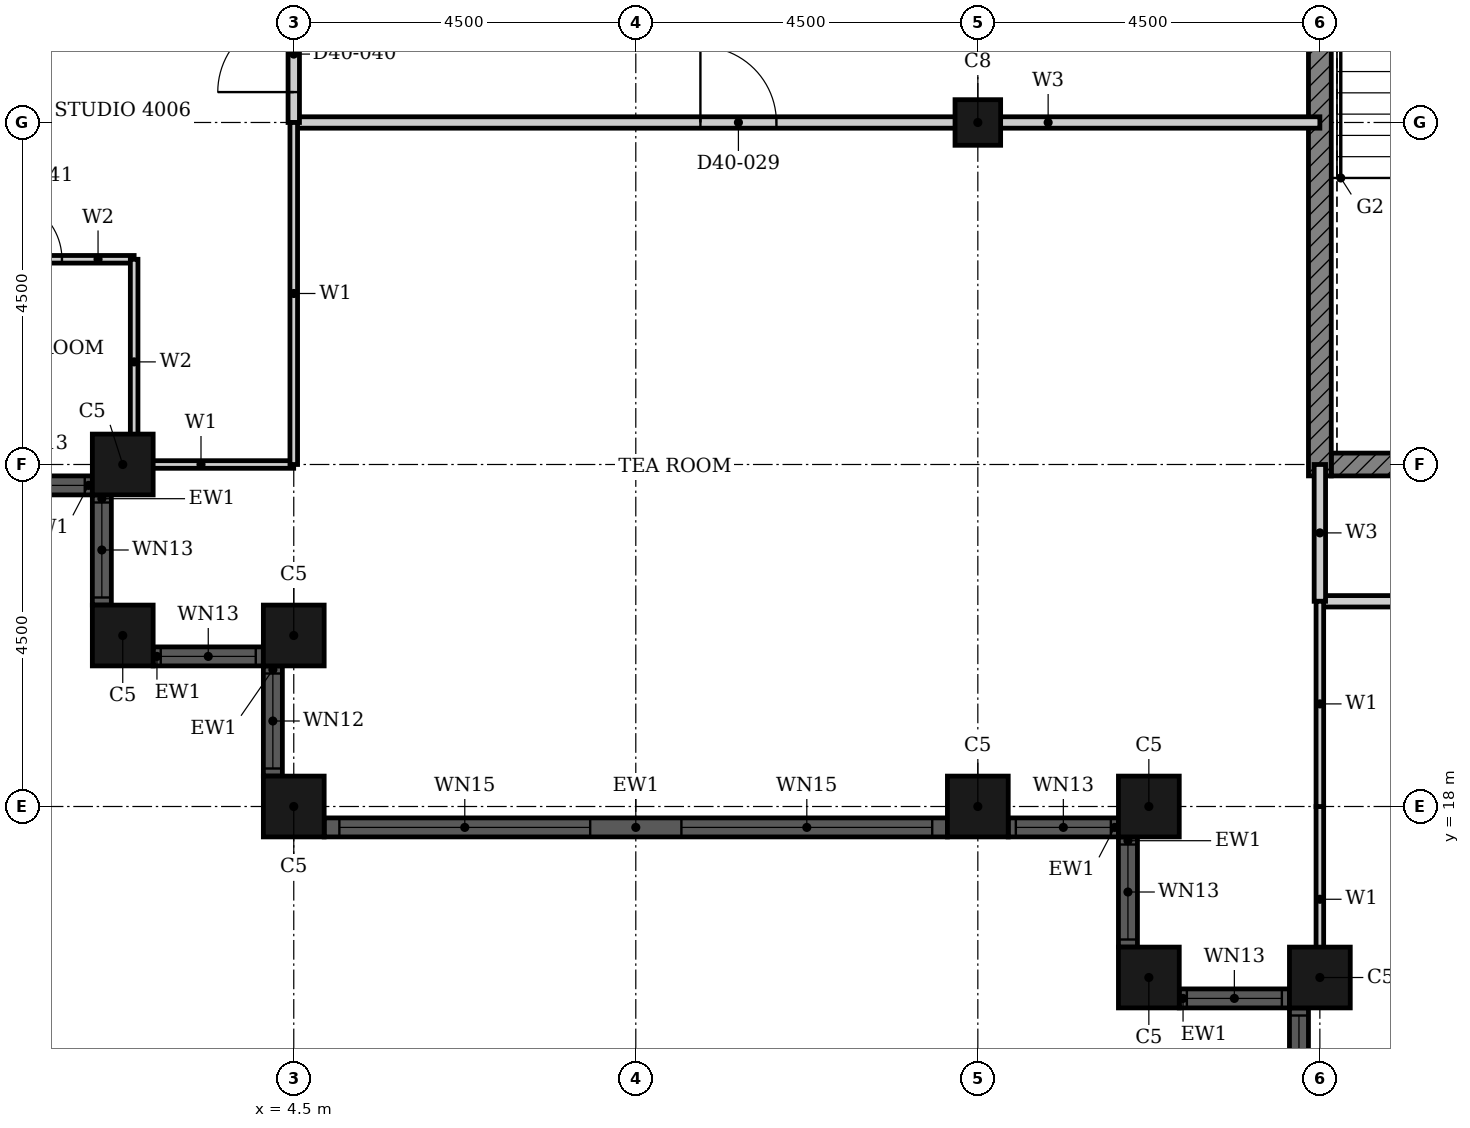
"""IFC4 building model, lengths in metres.
Left out: names, types, materials, properties, quantities, classifications, styles, units other than length and angle.
Written with IfcOpenShell. Run it as: python <this file> out.ifc"""

import sys

from ifc_helpers import new_model, si_unit, direction, frame, frame_2d, origin, origin_2d, place, context, subcontext, project, spatial, rectangle, hollow_rectangle, extrude, element, fill, save


model = new_model("IFC4")
c1 = context("Model", 3, precision=1e-05, world=origin(), true_north=direction((0.0, 1.0)))
c2 = subcontext(c1, "Body", "Model", "MODEL_VIEW")
j1 = project(units=[si_unit("LENGTHUNIT", "METRE"), si_unit("PLANEANGLEUNIT", "RADIAN")], contexts=[c1])
p1 = place(None, origin())
s1 = spatial("IfcSite", under=j1, at=p1, CompositionType="ELEMENT")
p2 = place(p1, origin())
s2 = spatial("IfcBuilding", under=s1, at=p2, CompositionType="ELEMENT")
p3 = place(p2, frame((0.0, 0.0, 161.7)))
s3 = spatial("IfcBuildingStorey", under=s2, at=p3, CompositionType="ELEMENT", Elevation=161.7)
for number, where, z_axis, x_axis in (
    (1, (2.25, 22.5, 0.0), (0.0, 0.0, 1.0), (1.0, 0.0, 0.0)),
    (2, (2.25, 20.25, 0.0), (0.0, 0.0, 1.0), (1.0, 0.0, 0.0)),
    (3, (4.5, 20.25, 0.0), (0.0, 0.0, 1.0), (1.0, 0.0, 0.0)),
    (4, (4.5, 18.0, 0.0), (0.0, 0.0, 1.0), (1.0, 0.0, 0.0)),
    (5, (13.5, 18.0, 0.0), (0.0, 0.0, 1.0), (1.0, 0.0, 0.0)),
    (6, (15.75, 18.0, 0.0), (0.0, 0.0, 1.0), (1.0, 0.0, 0.0)),
    (7, (15.75, 15.75, 0.0), (0.0, 0.0, 1.0), (1.0, 0.0, 0.0)),
    (8, (18.0, 15.75, 0.0), (0.0, 0.0, 1.0), (1.0, 0.0, 0.0)),
):
    element("IfcColumn", number, at=place(p3, frame(where, z_axis=z_axis, x_axis=x_axis)), inside=s3, PredefinedType="COLUMN", context=c2, shape_type="SweptSolid", body=[
        extrude(hollow_rectangle(XDim=0.8, YDim=0.8, WallThickness=0.025, at=origin_2d()), origin(), (0.0, 0.0, 1.0), 3.7),
    ])
p4 = place(p3, frame((13.5, 27.0, 0.0), z_axis=(0.0, 0.0, 1.0), x_axis=(1.0, 0.0, 0.0)))
e9 = element("IfcColumn", 9, at=p4, inside=s3, PredefinedType="COLUMN", context=c2, shape_type="SweptSolid", body=[
    extrude(hollow_rectangle(XDim=0.6, YDim=0.6, WallThickness=0.02, at=origin_2d()), origin(), (0.0, 0.0, 1.0), 3.7),
])
p5 = place(p3, frame((0.4, 22.225, 0.0), z_axis=(0.0, 0.0, 1.0), x_axis=(1.0, 0.0, 0.0)))
e10 = element("IfcWall", 10, at=p5, inside=s3, PredefinedType="SOLIDWALL", context=c2, shape_type="SweptSolid", body=[
    extrude(rectangle(XDim=1.45, YDim=0.25, at=frame_2d((0.725, 0.0))), origin(), (0.0, 0.0, 1.0), 3.7),
])
p6 = place(p5, frame((0.1, 0.0, 0.9)))
e11 = element("IfcOpeningElement", 11, at=p6, cuts=e10, PredefinedType="OPENING", context=c2, shape_type="SweptSolid", body=[
    extrude(rectangle(XDim=1.25, YDim=1.85, at=frame_2d((0.625, 0.925))), frame((0.0, 0.135, 0.0), z_axis=(0.0, -1.0, 0.0), x_axis=(1.0, 0.0, 0.0)), (0.0, 0.0, 1.0), 0.27),
])
p7 = place(p3, frame((1.975, 22.1, 0.0), z_axis=(0.0, 0.0, 1.0), x_axis=(0.0, -1.0, 0.0)))
e12 = element("IfcWall", 12, at=p7, inside=s3, PredefinedType="SOLIDWALL", context=c2, shape_type="SweptSolid", body=[
    extrude(rectangle(XDim=1.45, YDim=0.25, at=frame_2d((0.725, 0.0))), origin(), (0.0, 0.0, 1.0), 3.7),
])
p8 = place(p7, frame((0.1, 0.0, 0.9)))
e13 = element("IfcOpeningElement", 13, at=p8, cuts=e12, PredefinedType="OPENING", context=c2, shape_type="SweptSolid", body=[
    extrude(rectangle(XDim=1.25, YDim=1.85, at=frame_2d((0.625, 0.925))), frame((0.0, 0.135, 0.0), z_axis=(0.0, -1.0, 0.0), x_axis=(1.0, 0.0, 0.0)), (0.0, 0.0, 1.0), 0.27),
])
p9 = place(p3, frame((2.65, 19.975, 0.0), z_axis=(0.0, 0.0, 1.0), x_axis=(1.0, 0.0, 0.0)))
e14 = element("IfcWall", 14, at=p9, inside=s3, PredefinedType="SOLIDWALL", context=c2, shape_type="SweptSolid", body=[
    extrude(rectangle(XDim=1.45, YDim=0.25, at=frame_2d((0.725, 0.0))), origin(), (0.0, 0.0, 1.0), 3.7),
])
p10 = place(p9, frame((0.1, 0.0, 0.9)))
e15 = element("IfcOpeningElement", 15, at=p10, cuts=e14, PredefinedType="OPENING", context=c2, shape_type="SweptSolid", body=[
    extrude(rectangle(XDim=1.25, YDim=1.85, at=frame_2d((0.625, 0.925))), frame((0.0, 0.135, 0.0), z_axis=(0.0, -1.0, 0.0), x_axis=(1.0, 0.0, 0.0)), (0.0, 0.0, 1.0), 0.27),
])
p11 = place(p3, frame((4.225, 19.85, 0.0), z_axis=(0.0, 0.0, 1.0), x_axis=(0.0, -1.0, 0.0)))
e16 = element("IfcWall", 16, at=p11, inside=s3, PredefinedType="SOLIDWALL", context=c2, shape_type="SweptSolid", body=[
    extrude(rectangle(XDim=1.45, YDim=0.25, at=frame_2d((0.725, 0.0))), origin(), (0.0, 0.0, 1.0), 3.7),
])
p12 = place(p11, frame((0.1, 0.0, 0.9)))
e17 = element("IfcOpeningElement", 17, at=p12, cuts=e16, PredefinedType="OPENING", context=c2, shape_type="SweptSolid", body=[
    extrude(rectangle(XDim=1.25, YDim=2.08, at=frame_2d((0.625, 1.04))), frame((0.0, 0.135, 0.0), z_axis=(0.0, -1.0, 0.0), x_axis=(1.0, 0.0, 0.0)), (0.0, 0.0, 1.0), 0.27),
])
p13 = place(p3, frame((4.9, 17.725, 0.0), z_axis=(0.0, 0.0, 1.0), x_axis=(1.0, 0.0, 0.0)))
e18 = element("IfcWall", 18, at=p13, inside=s3, PredefinedType="SOLIDWALL", context=c2, shape_type="SweptSolid", body=[
    extrude(rectangle(XDim=8.2, YDim=0.25, at=frame_2d((4.1, 0.0))), origin(), (0.0, 0.0, 1.0), 3.7),
])
p14 = place(p13, frame((0.2, 0.0, 0.45)))
e19 = element("IfcOpeningElement", 19, at=p14, cuts=e18, PredefinedType="OPENING", context=c2, shape_type="SweptSolid", body=[
    extrude(rectangle(XDim=3.3, YDim=2.3, at=frame_2d((1.65, 1.15))), frame((0.0, 0.135, 0.0), z_axis=(0.0, -1.0, 0.0), x_axis=(1.0, 0.0, 0.0)), (0.0, 0.0, 1.0), 0.27),
])
p15 = place(p13, frame((4.7, 0.0, 0.45)))
e20 = element("IfcOpeningElement", 20, at=p15, cuts=e18, PredefinedType="OPENING", context=c2, shape_type="SweptSolid", body=[
    extrude(rectangle(XDim=3.3, YDim=2.3, at=frame_2d((1.65, 1.15))), frame((0.0, 0.135, 0.0), z_axis=(0.0, -1.0, 0.0), x_axis=(1.0, 0.0, 0.0)), (0.0, 0.0, 1.0), 0.27),
])
p16 = place(p3, frame((13.9, 17.725, 0.0), z_axis=(0.0, 0.0, 1.0), x_axis=(1.0, 0.0, 0.0)))
e21 = element("IfcWall", 21, at=p16, inside=s3, PredefinedType="SOLIDWALL", context=c2, shape_type="SweptSolid", body=[
    extrude(rectangle(XDim=1.45, YDim=0.25, at=frame_2d((0.725, 0.0))), origin(), (0.0, 0.0, 1.0), 3.7),
])
p17 = place(p16, frame((0.1, 0.0, 0.9)))
e22 = element("IfcOpeningElement", 22, at=p17, cuts=e21, PredefinedType="OPENING", context=c2, shape_type="SweptSolid", body=[
    extrude(rectangle(XDim=1.25, YDim=1.85, at=frame_2d((0.625, 0.925))), frame((0.0, 0.135, 0.0), z_axis=(0.0, -1.0, 0.0), x_axis=(1.0, 0.0, 0.0)), (0.0, 0.0, 1.0), 0.27),
])
p18 = place(p3, frame((15.475, 17.6, 0.0), z_axis=(0.0, 0.0, 1.0), x_axis=(0.0, -1.0, 0.0)))
e23 = element("IfcWall", 23, at=p18, inside=s3, PredefinedType="SOLIDWALL", context=c2, shape_type="SweptSolid", body=[
    extrude(rectangle(XDim=1.45, YDim=0.25, at=frame_2d((0.725, 0.0))), origin(), (0.0, 0.0, 1.0), 3.7),
])
p19 = place(p18, frame((0.1, 0.0, 0.9)))
e24 = element("IfcOpeningElement", 24, at=p19, cuts=e23, PredefinedType="OPENING", context=c2, shape_type="SweptSolid", body=[
    extrude(rectangle(XDim=1.25, YDim=1.85, at=frame_2d((0.625, 0.925))), frame((0.0, 0.135, 0.0), z_axis=(0.0, -1.0, 0.0), x_axis=(1.0, 0.0, 0.0)), (0.0, 0.0, 1.0), 0.27),
])
p20 = place(p3, frame((16.15, 15.475, 0.0), z_axis=(0.0, 0.0, 1.0), x_axis=(1.0, 0.0, 0.0)))
e25 = element("IfcWall", 25, at=p20, inside=s3, PredefinedType="SOLIDWALL", context=c2, shape_type="SweptSolid", body=[
    extrude(rectangle(XDim=1.45, YDim=0.25, at=frame_2d((0.725, 0.0))), origin(), (0.0, 0.0, 1.0), 3.7),
])
p21 = place(p20, frame((0.1, 0.0, 0.9)))
e26 = element("IfcOpeningElement", 26, at=p21, cuts=e25, PredefinedType="OPENING", context=c2, shape_type="SweptSolid", body=[
    extrude(rectangle(XDim=1.25, YDim=1.85, at=frame_2d((0.625, 0.925))), frame((0.0, 0.135, 0.0), z_axis=(0.0, -1.0, 0.0), x_axis=(1.0, 0.0, 0.0)), (0.0, 0.0, 1.0), 0.27),
])
p22 = place(p3, frame((17.725, 15.35, 0.0), z_axis=(0.0, 0.0, 1.0), x_axis=(0.0, -1.0, 0.0)))
e27 = element("IfcWall", 27, at=p22, inside=s3, PredefinedType="SOLIDWALL", context=c2, shape_type="SweptSolid", body=[
    extrude(rectangle(XDim=1.45, YDim=0.25, at=frame_2d((0.725, 0.0))), origin(), (0.0, 0.0, 1.0), 3.7),
])
p23 = place(p22, frame((0.1, 0.0, 0.9)))
e28 = element("IfcOpeningElement", 28, at=p23, cuts=e27, PredefinedType="OPENING", context=c2, shape_type="SweptSolid", body=[
    extrude(rectangle(XDim=1.25, YDim=1.85, at=frame_2d((0.625, 0.925))), frame((0.0, 0.135, 0.0), z_axis=(0.0, -1.0, 0.0), x_axis=(1.0, 0.0, 0.0)), (0.0, 0.0, 1.0), 0.27),
])
p24 = place(p3, frame((18.15, 22.5, 0.0), z_axis=(0.0, 0.0, 1.0), x_axis=(1.0, 0.0, 0.0)))
e29 = element("IfcWall", 29, at=p24, inside=s3, PredefinedType="SHEAR", context=c2, shape_type="SweptSolid", body=[
    extrude(rectangle(XDim=4.225, YDim=0.3, at=frame_2d((2.113, 0.0))), origin(), (0.0, 0.0, 1.0), 3.4),
])
p25 = place(p3, frame((18.0, 22.35, 0.0), z_axis=(0.0, 0.0, 1.0), x_axis=(0.0, 1.0, 0.0)))
e30 = element("IfcWall", 30, at=p25, inside=s3, PredefinedType="SHEAR", context=c2, shape_type="SweptSolid", body=[
    extrude(rectangle(XDim=9.3, YDim=0.3, at=frame_2d((4.65, 0.0))), origin(), (0.0, 0.0, 1.0), 3.4),
])
p26 = place(p3, frame((18.0, 20.7, 0.0), z_axis=(0.0, 0.0, 1.0), x_axis=(1.0, 0.0, 0.0)))
e31 = element("IfcWall", 31, at=p26, inside=s3, PredefinedType="PARTITIONING", context=c2, shape_type="SweptSolid", body=[
    extrude(rectangle(XDim=13.5, YDim=0.15, at=frame_2d((6.75, 0.0))), origin(), (0.0, 0.0, 1.0), 3.4),
])
p27 = place(p26, frame((6.25, 0.0, 0.0)))
e32 = element("IfcOpeningElement", 32, at=p27, cuts=e31, PredefinedType="OPENING", context=c2, shape_type="SweptSolid", body=[
    extrude(rectangle(XDim=1.0, YDim=2.1, at=frame_2d((0.5, 1.05))), frame((0.0, 0.085, 0.0), z_axis=(0.0, -1.0, 0.0), x_axis=(1.0, 0.0, 0.0)), (0.0, 0.0, 1.0), 0.17),
])
p28 = place(p3, frame((4.5, 27.0, 0.0), z_axis=(0.0, 0.0, 1.0), x_axis=(1.0, 0.0, 0.0)))
e33 = element("IfcWall", 33, at=p28, inside=s3, PredefinedType="PARTITIONING", context=c2, shape_type="SweptSolid", body=[
    extrude(rectangle(XDim=13.5, YDim=0.15, at=frame_2d((6.75, 0.0))), origin(), (0.0, 0.0, 1.0), 2.68),
])
p29 = place(p28, frame((5.35, 0.0, 0.0)))
e34 = element("IfcOpeningElement", 34, at=p29, cuts=e33, PredefinedType="OPENING", context=c2, shape_type="SweptSolid", body=[
    extrude(rectangle(XDim=1.0, YDim=2.1, at=frame_2d((0.5, 1.05))), frame((0.0, 0.085, 0.0), z_axis=(0.0, -1.0, 0.0), x_axis=(1.0, 0.0, 0.0)), (0.0, 0.0, 1.0), 0.17),
])
p30 = place(p3, frame((18.0, 20.7, 0.0), z_axis=(0.0, 0.0, 1.0), x_axis=(0.0, 1.0, 0.0)))
e35 = element("IfcWall", 35, at=p30, inside=s3, PredefinedType="PARTITIONING", context=c2, shape_type="SweptSolid", body=[
    extrude(rectangle(XDim=1.8, YDim=0.15, at=frame_2d((0.9, 0.0))), origin(), (0.0, 0.0, 1.0), 3.4),
])
p31 = place(p3, frame((4.5, 27.0, 0.0), z_axis=(0.0, 0.0, 1.0), x_axis=(0.0, 1.0, 0.0)))
e36 = element("IfcWall", 36, at=p31, inside=s3, PredefinedType="PARTITIONING", context=c2, shape_type="SweptSolid", body=[
    extrude(rectangle(XDim=1.8, YDim=0.15, at=frame_2d((0.9, 0.0))), origin(), (0.0, 0.0, 1.0), 3.4),
])
p32 = place(p31, frame((0.4, 0.0, 0.0)))
e37 = element("IfcOpeningElement", 37, at=p32, cuts=e36, PredefinedType="OPENING", context=c2, shape_type="SweptSolid", body=[
    extrude(rectangle(XDim=1.0, YDim=2.2, at=frame_2d((0.5, 1.1))), frame((0.0, 0.085, 0.0), z_axis=(0.0, -1.0, 0.0), x_axis=(1.0, 0.0, 0.0)), (0.0, 0.0, 1.0), 0.17),
])
p33 = place(p3, frame((2.06, 22.5, 0.0), z_axis=(0.0, 0.0, 1.0), x_axis=(1.0, 0.0, 0.0)))
e38 = element("IfcWall", 38, at=p33, inside=s3, PredefinedType="PARTITIONING", context=c2, shape_type="SweptSolid", body=[
    extrude(rectangle(XDim=2.439, YDim=0.1, at=frame_2d((1.219, 0.0))), origin(), (0.0, 0.0, 1.0), 2.68),
])
p34 = place(p3, frame((18.0, 15.56, 0.0), z_axis=(0.0, 0.0, 1.0), x_axis=(0.0, 1.0, 0.0)))
e39 = element("IfcWall", 39, at=p34, inside=s3, PredefinedType="PARTITIONING", context=c2, shape_type="SweptSolid", body=[
    extrude(rectangle(XDim=2.439, YDim=0.1, at=frame_2d((1.219, 0.0))), origin(), (0.0, 0.0, 1.0), 3.4),
])
p35 = place(p3, frame((18.0, 18.0, 0.0), z_axis=(0.0, 0.0, 1.0), x_axis=(0.0, 1.0, 0.0)))
e40 = element("IfcWall", 40, at=p35, inside=s3, PredefinedType="PARTITIONING", context=c2, shape_type="SweptSolid", body=[
    extrude(rectangle(XDim=2.7, YDim=0.1, at=frame_2d((1.35, 0.0))), origin(), (0.0, 0.0, 1.0), 3.4),
])
p36 = place(p3, frame((4.5, 22.5, 0.0), z_axis=(0.0, 0.0, 1.0), x_axis=(0.0, 1.0, 0.0)))
e41 = element("IfcWall", 41, at=p36, inside=s3, PredefinedType="PARTITIONING", context=c2, shape_type="SweptSolid", body=[
    extrude(rectangle(XDim=4.5, YDim=0.1, at=frame_2d((2.25, 0.0))), origin(), (0.0, 0.0, 1.0), 3.4),
])
p37 = place(p3, frame((-0.15, 25.2, 0.0), z_axis=(0.0, 0.0, 1.0), x_axis=(1.0, 0.0, 0.0)))
e42 = element("IfcWall", 42, at=p37, inside=s3, PredefinedType="PARTITIONING", context=c2, shape_type="SweptSolid", body=[
    extrude(rectangle(XDim=2.55, YDim=0.1, at=frame_2d((1.275, 0.0))), origin(), (0.0, 0.0, 1.0), 3.4),
])
p38 = place(p37, frame((0.8, 0.0, 0.0)))
e43 = element("IfcOpeningElement", 43, at=p38, cuts=e42, PredefinedType="OPENING", context=c2, shape_type="SweptSolid", body=[
    extrude(rectangle(XDim=0.8, YDim=2.1, at=frame_2d((0.4, 1.05))), frame((0.0, 0.06, 0.0), z_axis=(0.0, -1.0, 0.0), x_axis=(1.0, 0.0, 0.0)), (0.0, 0.0, 1.0), 0.12),
])
p39 = place(p3, frame((2.4, 22.5, 0.0), z_axis=(0.0, 0.0, 1.0), x_axis=(0.0, 1.0, 0.0)))
e44 = element("IfcWall", 44, at=p39, inside=s3, PredefinedType="PARTITIONING", context=c2, shape_type="SweptSolid", body=[
    extrude(rectangle(XDim=2.7, YDim=0.1, at=frame_2d((1.35, 0.0))), origin(), (0.0, 0.0, 1.0), 3.4),
])
p40 = place(p6, origin())
e45 = element("IfcWindow", 45, at=p40, inside=s3, PartitioningType="SINGLE_PANEL", PredefinedType="WINDOW", context=c2, shape_type="SweptSolid", body=[
    extrude(rectangle(XDim=1.25, YDim=1.85, at=frame_2d((0.625, 0.925))), frame((0.0, 0.03, 0.0), z_axis=(0.0, -1.0, 0.0), x_axis=(1.0, 0.0, 0.0)), (0.0, 0.0, 1.0), 0.06),
])
fill(e11, e45)
p41 = place(p8, origin())
e46 = element("IfcWindow", 46, at=p41, inside=s3, PartitioningType="SINGLE_PANEL", PredefinedType="WINDOW", context=c2, shape_type="SweptSolid", body=[
    extrude(rectangle(XDim=1.25, YDim=1.85, at=frame_2d((0.625, 0.925))), frame((0.0, 0.03, 0.0), z_axis=(0.0, -1.0, 0.0), x_axis=(1.0, 0.0, 0.0)), (0.0, 0.0, 1.0), 0.06),
])
fill(e13, e46)
p42 = place(p10, origin())
e47 = element("IfcWindow", 47, at=p42, inside=s3, PartitioningType="SINGLE_PANEL", PredefinedType="WINDOW", context=c2, shape_type="SweptSolid", body=[
    extrude(rectangle(XDim=1.25, YDim=1.85, at=frame_2d((0.625, 0.925))), frame((0.0, 0.03, 0.0), z_axis=(0.0, -1.0, 0.0), x_axis=(1.0, 0.0, 0.0)), (0.0, 0.0, 1.0), 0.06),
])
fill(e15, e47)
p43 = place(p12, origin())
e48 = element("IfcWindow", 48, at=p43, inside=s3, PartitioningType="SINGLE_PANEL", PredefinedType="WINDOW", context=c2, shape_type="SweptSolid", body=[
    extrude(rectangle(XDim=1.25, YDim=2.08, at=frame_2d((0.625, 1.04))), frame((0.0, 0.03, 0.0), z_axis=(0.0, -1.0, 0.0), x_axis=(1.0, 0.0, 0.0)), (0.0, 0.0, 1.0), 0.06),
])
fill(e17, e48)
p44 = place(p14, origin())
e49 = element("IfcWindow", 49, at=p44, inside=s3, PartitioningType="SINGLE_PANEL", PredefinedType="WINDOW", context=c2, shape_type="SweptSolid", body=[
    extrude(rectangle(XDim=3.3, YDim=2.3, at=frame_2d((1.65, 1.15))), frame((0.0, 0.03, 0.0), z_axis=(0.0, -1.0, 0.0), x_axis=(1.0, 0.0, 0.0)), (0.0, 0.0, 1.0), 0.06),
])
fill(e19, e49)
p45 = place(p15, origin())
e50 = element("IfcWindow", 50, at=p45, inside=s3, PartitioningType="SINGLE_PANEL", PredefinedType="WINDOW", context=c2, shape_type="SweptSolid", body=[
    extrude(rectangle(XDim=3.3, YDim=2.3, at=frame_2d((1.65, 1.15))), frame((0.0, 0.03, 0.0), z_axis=(0.0, -1.0, 0.0), x_axis=(1.0, 0.0, 0.0)), (0.0, 0.0, 1.0), 0.06),
])
fill(e20, e50)
p46 = place(p17, origin())
e51 = element("IfcWindow", 51, at=p46, inside=s3, PartitioningType="SINGLE_PANEL", PredefinedType="WINDOW", context=c2, shape_type="SweptSolid", body=[
    extrude(rectangle(XDim=1.25, YDim=1.85, at=frame_2d((0.625, 0.925))), frame((0.0, 0.03, 0.0), z_axis=(0.0, -1.0, 0.0), x_axis=(1.0, 0.0, 0.0)), (0.0, 0.0, 1.0), 0.06),
])
fill(e22, e51)
p47 = place(p19, origin())
e52 = element("IfcWindow", 52, at=p47, inside=s3, PartitioningType="SINGLE_PANEL", PredefinedType="WINDOW", context=c2, shape_type="SweptSolid", body=[
    extrude(rectangle(XDim=1.25, YDim=1.85, at=frame_2d((0.625, 0.925))), frame((0.0, 0.03, 0.0), z_axis=(0.0, -1.0, 0.0), x_axis=(1.0, 0.0, 0.0)), (0.0, 0.0, 1.0), 0.06),
])
fill(e24, e52)
p48 = place(p21, origin())
e53 = element("IfcWindow", 53, at=p48, inside=s3, PartitioningType="SINGLE_PANEL", PredefinedType="WINDOW", context=c2, shape_type="SweptSolid", body=[
    extrude(rectangle(XDim=1.25, YDim=1.85, at=frame_2d((0.625, 0.925))), frame((0.0, 0.03, 0.0), z_axis=(0.0, -1.0, 0.0), x_axis=(1.0, 0.0, 0.0)), (0.0, 0.0, 1.0), 0.06),
])
fill(e26, e53)
p49 = place(p23, origin())
e54 = element("IfcWindow", 54, at=p49, inside=s3, PartitioningType="SINGLE_PANEL", PredefinedType="WINDOW", context=c2, shape_type="SweptSolid", body=[
    extrude(rectangle(XDim=1.25, YDim=1.85, at=frame_2d((0.625, 0.925))), frame((0.0, 0.03, 0.0), z_axis=(0.0, -1.0, 0.0), x_axis=(1.0, 0.0, 0.0)), (0.0, 0.0, 1.0), 0.06),
])
fill(e28, e54)
p50 = place(p29, origin())
e55 = element("IfcDoor", 55, at=p50, inside=s3, OperationType="SINGLE_SWING_LEFT", PredefinedType="DOOR", context=c2, shape_type="SweptSolid", body=[
    extrude(rectangle(XDim=1.0, YDim=2.1, at=frame_2d((0.5, 1.05))), frame((0.0, 0.025, 0.0), z_axis=(0.0, -1.0, 0.0), x_axis=(1.0, 0.0, 0.0)), (0.0, 0.0, 1.0), 0.05),
])
fill(e34, e55)
p51 = place(p32, origin())
e56 = element("IfcDoor", 56, at=p51, inside=s3, OperationType="SINGLE_SWING_RIGHT", PredefinedType="DOOR", context=c2, shape_type="SweptSolid", body=[
    extrude(rectangle(XDim=1.0, YDim=2.2, at=frame_2d((0.5, 1.1))), frame((0.0, 0.025, 0.0), z_axis=(0.0, -1.0, 0.0), x_axis=(1.0, 0.0, 0.0)), (0.0, 0.0, 1.0), 0.05),
])
fill(e37, e56)
p52 = place(p38, origin())
e57 = element("IfcDoor", 57, at=p52, inside=s3, OperationType="SINGLE_SWING_RIGHT", PredefinedType="DOOR", context=c2, shape_type="SweptSolid", body=[
    extrude(rectangle(XDim=0.8, YDim=2.1, at=frame_2d((0.4, 1.05))), frame((0.0, 0.025, 0.0), z_axis=(0.0, -1.0, 0.0), x_axis=(1.0, 0.0, 0.0)), (0.0, 0.0, 1.0), 0.05),
])
fill(e43, e57)
save(model, sys.argv[1])
